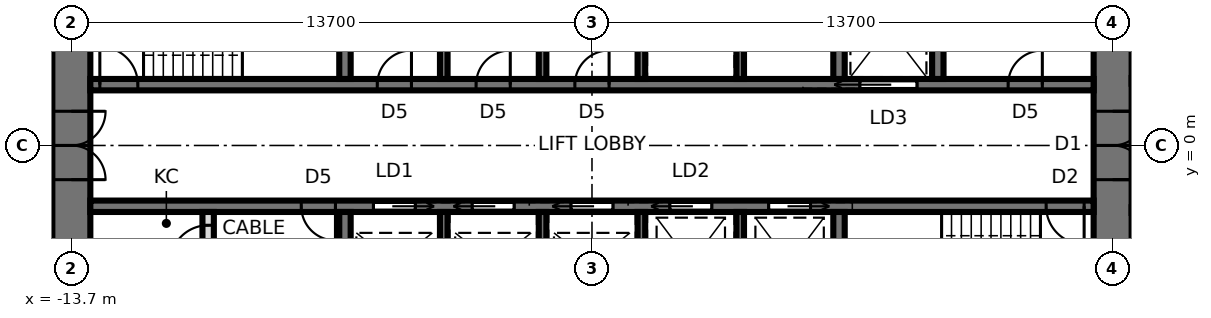
"""IFC4 building model, lengths in metres.
Left out: names, types, materials, properties, quantities, classifications, styles, units other than length and angle.
Written with IfcOpenShell. Run it as: python <this file> out.ifc"""

import sys

from ifc_helpers import new_model, si_unit, direction, frame, frame_2d, origin, place, context, subcontext, project, spatial, rectangle, extrude, element, fill, save


model = new_model("IFC4")
c1 = context("Model", 3, precision=1e-05, world=origin(), true_north=direction((0.0, 1.0)))
c2 = subcontext(c1, "Body", "Model", "MODEL_VIEW")
j1 = project(units=[si_unit("LENGTHUNIT", "METRE"), si_unit("PLANEANGLEUNIT", "RADIAN")], contexts=[c1])
p1 = place(None, origin())
s1 = spatial("IfcSite", under=j1, at=p1, CompositionType="ELEMENT")
p2 = place(p1, origin())
s2 = spatial("IfcBuilding", under=s1, at=p2, CompositionType="ELEMENT")
p3 = place(p2, frame((0.0, 0.0, 96.3)))
s3 = spatial("IfcBuildingStorey", under=s2, at=p3, CompositionType="ELEMENT", Elevation=96.3)
p4 = place(p3, frame((13.7, -9.5, 0.0), z_axis=(0.0, 0.0, 1.0), x_axis=(0.0, 1.0, 0.0)))
e1 = element("IfcWall", 1, at=p4, inside=s3, PredefinedType="SHEAR", context=c2, shape_type="SweptSolid", body=[
    extrude(rectangle(XDim=19.0, YDim=1.0, at=frame_2d((9.5, 0.0))), origin(), (0.0, 0.0, 1.0), 3.9),
])
p5 = place(p4, frame((8.6, 0.0, 0.0)))
e2 = element("IfcOpeningElement", 2, at=p5, cuts=e1, PredefinedType="OPENING", context=c2, shape_type="SweptSolid", body=[
    extrude(rectangle(XDim=1.8, YDim=2.4, at=frame_2d((0.9, 1.2))), frame((0.0, 0.51, 0.0), z_axis=(0.0, -1.0, 0.0), x_axis=(1.0, 0.0, 0.0)), (0.0, 0.0, 1.0), 1.02),
])
p6 = place(p3, frame((-13.7, 9.5, 0.0), z_axis=(0.0, 0.0, 1.0), x_axis=(0.0, -1.0, 0.0)))
e3 = element("IfcWall", 3, at=p6, inside=s3, PredefinedType="SHEAR", context=c2, shape_type="SweptSolid", body=[
    extrude(rectangle(XDim=19.0, YDim=1.0, at=frame_2d((9.5, 0.0))), origin(), (0.0, 0.0, 1.0), 3.9),
])
p7 = place(p6, frame((8.6, 0.0, 0.0)))
e4 = element("IfcOpeningElement", 4, at=p7, cuts=e3, PredefinedType="OPENING", context=c2, shape_type="SweptSolid", body=[
    extrude(rectangle(XDim=1.8, YDim=2.4, at=frame_2d((0.9, 1.2))), frame((0.0, 0.51, 0.0), z_axis=(0.0, -1.0, 0.0), x_axis=(1.0, 0.0, 0.0)), (0.0, 0.0, 1.0), 1.02),
])
p8 = place(p3, frame((-13.2, 1.6, 0.0), z_axis=(0.0, 0.0, 1.0), x_axis=(1.0, 0.0, 0.0)))
e5 = element("IfcWall", 5, at=p8, inside=s3, PredefinedType="SHEAR", context=c2, shape_type="SweptSolid", body=[
    extrude(rectangle(XDim=26.4, YDim=0.3, at=frame_2d((13.2, 0.0))), origin(), (0.0, 0.0, 1.0), 3.9),
])
p9 = place(p8, frame((0.25, 0.0, 0.0)))
e6 = element("IfcOpeningElement", 6, at=p9, cuts=e5, PredefinedType="OPENING", context=c2, shape_type="SweptSolid", body=[
    extrude(rectangle(XDim=1.0, YDim=2.1, at=frame_2d((0.5, 1.05))), frame((0.0, 0.16, 0.0), z_axis=(0.0, -1.0, 0.0), x_axis=(1.0, 0.0, 0.0)), (0.0, 0.0, 1.0), 0.32),
])
p10 = place(p8, frame((20.25, 0.0, 0.0)))
e7 = element("IfcOpeningElement", 7, at=p10, cuts=e5, PredefinedType="OPENING", context=c2, shape_type="SweptSolid", body=[
    extrude(rectangle(XDim=1.5, YDim=2.4, at=frame_2d((0.75, 1.2))), frame((0.0, 0.16, 0.0), z_axis=(0.0, -1.0, 0.0), x_axis=(1.0, 0.0, 0.0)), (0.0, 0.0, 1.0), 0.32),
])
p11 = place(p8, frame((7.55, 0.0, 0.0)))
e8 = element("IfcOpeningElement", 8, at=p11, cuts=e5, PredefinedType="OPENING", context=c2, shape_type="SweptSolid", body=[
    extrude(rectangle(XDim=0.9, YDim=2.1, at=frame_2d((0.45, 1.05))), frame((0.0, 0.16, 0.0), z_axis=(0.0, -1.0, 0.0), x_axis=(1.0, 0.0, 0.0)), (0.0, 0.0, 1.0), 0.32),
])
p12 = place(p8, frame((10.15, 0.0, 0.0)))
e9 = element("IfcOpeningElement", 9, at=p12, cuts=e5, PredefinedType="OPENING", context=c2, shape_type="SweptSolid", body=[
    extrude(rectangle(XDim=0.9, YDim=2.1, at=frame_2d((0.45, 1.05))), frame((0.0, 0.16, 0.0), z_axis=(0.0, -1.0, 0.0), x_axis=(1.0, 0.0, 0.0)), (0.0, 0.0, 1.0), 0.32),
])
p13 = place(p8, frame((12.75, 0.0, 0.0)))
e10 = element("IfcOpeningElement", 10, at=p13, cuts=e5, PredefinedType="OPENING", context=c2, shape_type="SweptSolid", body=[
    extrude(rectangle(XDim=0.9, YDim=2.1, at=frame_2d((0.45, 1.05))), frame((0.0, 0.16, 0.0), z_axis=(0.0, -1.0, 0.0), x_axis=(1.0, 0.0, 0.0)), (0.0, 0.0, 1.0), 0.32),
])
p14 = place(p8, frame((24.15, 0.0, 0.0)))
e11 = element("IfcOpeningElement", 11, at=p14, cuts=e5, PredefinedType="OPENING", context=c2, shape_type="SweptSolid", body=[
    extrude(rectangle(XDim=0.9, YDim=2.1, at=frame_2d((0.45, 1.05))), frame((0.0, 0.16, 0.0), z_axis=(0.0, -1.0, 0.0), x_axis=(1.0, 0.0, 0.0)), (0.0, 0.0, 1.0), 0.32),
])
p15 = place(p3, frame((-13.2, -1.6, 0.0), z_axis=(0.0, 0.0, 1.0), x_axis=(1.0, 0.0, 0.0)))
e12 = element("IfcWall", 12, at=p15, inside=s3, PredefinedType="SHEAR", context=c2, shape_type="SweptSolid", body=[
    extrude(rectangle(XDim=26.4, YDim=0.3, at=frame_2d((13.2, 0.0))), origin(), (0.0, 0.0, 1.0), 3.9),
])
p16 = place(p15, frame((25.15, 0.0, 0.0)))
e13 = element("IfcOpeningElement", 13, at=p16, cuts=e12, PredefinedType="OPENING", context=c2, shape_type="SweptSolid", body=[
    extrude(rectangle(XDim=1.0, YDim=2.1, at=frame_2d((0.5, 1.05))), frame((0.0, 0.16, 0.0), z_axis=(0.0, -1.0, 0.0), x_axis=(1.0, 0.0, 0.0)), (0.0, 0.0, 1.0), 0.32),
])
p17 = place(p15, frame((7.45, 0.0, 0.0)))
e14 = element("IfcOpeningElement", 14, at=p17, cuts=e12, PredefinedType="OPENING", context=c2, shape_type="SweptSolid", body=[
    extrude(rectangle(XDim=1.1, YDim=2.3, at=frame_2d((0.55, 1.15))), frame((0.0, 0.16, 0.0), z_axis=(0.0, -1.0, 0.0), x_axis=(1.0, 0.0, 0.0)), (0.0, 0.0, 1.0), 0.32),
])
p18 = place(p15, frame((10.05, 0.0, 0.0)))
e15 = element("IfcOpeningElement", 15, at=p18, cuts=e12, PredefinedType="OPENING", context=c2, shape_type="SweptSolid", body=[
    extrude(rectangle(XDim=1.1, YDim=2.3, at=frame_2d((0.55, 1.15))), frame((0.0, 0.16, 0.0), z_axis=(0.0, -1.0, 0.0), x_axis=(1.0, 0.0, 0.0)), (0.0, 0.0, 1.0), 0.32),
])
p19 = place(p15, frame((12.65, 0.0, 0.0)))
e16 = element("IfcOpeningElement", 16, at=p19, cuts=e12, PredefinedType="OPENING", context=c2, shape_type="SweptSolid", body=[
    extrude(rectangle(XDim=1.1, YDim=2.3, at=frame_2d((0.55, 1.15))), frame((0.0, 0.16, 0.0), z_axis=(0.0, -1.0, 0.0), x_axis=(1.0, 0.0, 0.0)), (0.0, 0.0, 1.0), 0.32),
])
p20 = place(p15, frame((15.25, 0.0, 0.0)))
e17 = element("IfcOpeningElement", 17, at=p20, cuts=e12, PredefinedType="OPENING", context=c2, shape_type="SweptSolid", body=[
    extrude(rectangle(XDim=1.1, YDim=2.3, at=frame_2d((0.55, 1.15))), frame((0.0, 0.16, 0.0), z_axis=(0.0, -1.0, 0.0), x_axis=(1.0, 0.0, 0.0)), (0.0, 0.0, 1.0), 0.32),
])
p21 = place(p15, frame((17.85, 0.0, 0.0)))
e18 = element("IfcOpeningElement", 18, at=p21, cuts=e12, PredefinedType="OPENING", context=c2, shape_type="SweptSolid", body=[
    extrude(rectangle(XDim=1.1, YDim=2.3, at=frame_2d((0.55, 1.15))), frame((0.0, 0.16, 0.0), z_axis=(0.0, -1.0, 0.0), x_axis=(1.0, 0.0, 0.0)), (0.0, 0.0, 1.0), 0.32),
])
p22 = place(p15, frame((5.55, 0.0, 0.0)))
e19 = element("IfcOpeningElement", 19, at=p22, cuts=e12, PredefinedType="OPENING", context=c2, shape_type="SweptSolid", body=[
    extrude(rectangle(XDim=0.9, YDim=2.1, at=frame_2d((0.45, 1.05))), frame((0.0, 0.16, 0.0), z_axis=(0.0, -1.0, 0.0), x_axis=(1.0, 0.0, 0.0)), (0.0, 0.0, 1.0), 0.32),
])
for number, where, z_axis, x_axis in (
    (20, (-6.5, 1.75, 0.0), (0.0, 0.0, 1.0), (0.0, 1.0, 0.0)),
    (21, (6.5, 1.75, 0.0), (0.0, 0.0, 1.0), (0.0, 1.0, 0.0)),
):
    element("IfcWall", number, at=place(p3, frame(where, z_axis=z_axis, x_axis=x_axis)), inside=s3, PredefinedType="SHEAR", context=c2, shape_type="SweptSolid", body=[
        extrude(rectangle(XDim=2.7, YDim=0.3, at=frame_2d((1.35, 0.0))), origin(), (0.0, 0.0, 1.0), 3.9),
    ])
for number, where, z_axis, x_axis in (
    (22, (-3.9, 1.75, 0.0), (0.0, 0.0, 1.0), (0.0, 1.0, 0.0)),
    (23, (-1.3, 1.75, 0.0), (0.0, 0.0, 1.0), (0.0, 1.0, 0.0)),
    (24, (1.3, 1.75, 0.0), (0.0, 0.0, 1.0), (0.0, 1.0, 0.0)),
    (25, (3.9, 1.75, 0.0), (0.0, 0.0, 1.0), (0.0, 1.0, 0.0)),
):
    element("IfcWall", number, at=place(p3, frame(where, z_axis=z_axis, x_axis=x_axis)), inside=s3, PredefinedType="SHEAR", context=c2, shape_type="SweptSolid", body=[
        extrude(rectangle(XDim=2.7, YDim=0.2, at=frame_2d((1.35, 0.0))), origin(), (0.0, 0.0, 1.0), 3.9),
    ])
for number, where, z_axis, x_axis in (
    (26, (-6.5, -1.75, 0.0), (0.0, 0.0, 1.0), (0.0, -1.0, 0.0)),
    (27, (6.5, -1.75, 0.0), (0.0, 0.0, 1.0), (0.0, -1.0, 0.0)),
):
    element("IfcWall", number, at=place(p3, frame(where, z_axis=z_axis, x_axis=x_axis)), inside=s3, PredefinedType="SHEAR", context=c2, shape_type="SweptSolid", body=[
        extrude(rectangle(XDim=2.7, YDim=0.3, at=frame_2d((1.35, 0.0))), origin(), (0.0, 0.0, 1.0), 3.9),
    ])
for number, where, z_axis, x_axis in (
    (28, (-3.9, -1.75, 0.0), (0.0, 0.0, 1.0), (0.0, -1.0, 0.0)),
    (29, (-1.3, -1.75, 0.0), (0.0, 0.0, 1.0), (0.0, -1.0, 0.0)),
    (30, (1.3, -1.75, 0.0), (0.0, 0.0, 1.0), (0.0, -1.0, 0.0)),
    (31, (3.9, -1.75, 0.0), (0.0, 0.0, 1.0), (0.0, -1.0, 0.0)),
):
    element("IfcWall", number, at=place(p3, frame(where, z_axis=z_axis, x_axis=x_axis)), inside=s3, PredefinedType="SHEAR", context=c2, shape_type="SweptSolid", body=[
        extrude(rectangle(XDim=2.7, YDim=0.2, at=frame_2d((1.35, 0.0))), origin(), (0.0, 0.0, 1.0), 3.9),
    ])
p23 = place(p3, frame((9.1, 1.75, 0.0), z_axis=(0.0, 0.0, 1.0), x_axis=(0.0, 1.0, 0.0)))
e32 = element("IfcWall", 32, at=p23, inside=s3, PredefinedType="SHEAR", context=c2, shape_type="SweptSolid", body=[
    extrude(rectangle(XDim=2.7, YDim=0.3, at=frame_2d((1.35, 0.0))), origin(), (0.0, 0.0, 1.0), 3.9),
])
p24 = place(p3, frame((-10.1, -3.25, 0.0), z_axis=(0.0, 0.0, 1.0), x_axis=(0.0, 1.0, 0.0)))
e33 = element("IfcWall", 33, at=p24, inside=s3, PredefinedType="PARTITIONING", context=c2, shape_type="SweptSolid", body=[
    extrude(rectangle(XDim=1.5, YDim=0.3, at=frame_2d((0.75, 0.0))), origin(), (0.0, 0.0, 1.0), 3.74),
])
p25 = place(p24, frame((0.15, 0.0, 0.0)))
e34 = element("IfcOpeningElement", 34, at=p25, cuts=e33, PredefinedType="OPENING", context=c2, shape_type="SweptSolid", body=[
    extrude(rectangle(XDim=1.0, YDim=2.4, at=frame_2d((0.5, 1.2))), frame((0.0, 0.16, 0.0), z_axis=(0.0, -1.0, 0.0), x_axis=(1.0, 0.0, 0.0)), (0.0, 0.0, 1.0), 0.32),
])
p26 = place(p3, frame((18.4, 1.7, 0.0), z_axis=(0.0, 0.0, 1.0), x_axis=(-1.0, 0.0, 0.0)))
e35 = element("IfcWall", 35, at=p26, inside=s3, PredefinedType="PARTITIONING", context=c2, shape_type="SweptSolid", body=[
    extrude(rectangle(XDim=4.2, YDim=0.15, at=frame_2d((2.1, 0.0))), origin(), (0.0, 0.0, 1.0), 3.74),
])
p27 = place(p7, origin())
e36 = element("IfcDoor", 36, at=p27, inside=s3, OperationType="DOUBLE_DOOR_SINGLE_SWING", PredefinedType="DOOR", context=c2, shape_type="SweptSolid", body=[
    extrude(rectangle(XDim=1.72, YDim=2.36, at=frame_2d((0.9, 1.18))), frame((0.0, 0.025, 0.0), z_axis=(0.0, -1.0, 0.0), x_axis=(1.0, 0.0, 0.0)), (0.0, 0.0, 1.0), 0.05),
    extrude(rectangle(XDim=0.04, YDim=2.4, at=frame_2d((0.02, 1.2))), frame((0.0, 0.25, 0.0), z_axis=(0.0, -1.0, 0.0), x_axis=(1.0, 0.0, 0.0)), (0.0, 0.0, 1.0), 0.5),
    extrude(rectangle(XDim=0.04, YDim=2.4, at=frame_2d((1.78, 1.2))), frame((0.0, 0.25, 0.0), z_axis=(0.0, -1.0, 0.0), x_axis=(1.0, 0.0, 0.0)), (0.0, 0.0, 1.0), 0.5),
    extrude(rectangle(XDim=1.72, YDim=0.04, at=frame_2d((0.9, 2.38))), frame((0.0, 0.25, 0.0), z_axis=(0.0, -1.0, 0.0), x_axis=(1.0, 0.0, 0.0)), (0.0, 0.0, 1.0), 0.5),
])
fill(e4, e36)
p28 = place(p5, frame((1.8, 0.0, 0.0), z_axis=(0.0, 0.0, 1.0), x_axis=(-1.0, 0.0, 0.0)))
e37 = element("IfcDoor", 37, at=p28, inside=s3, OperationType="DOUBLE_DOOR_SINGLE_SWING", PredefinedType="DOOR", context=c2, shape_type="SweptSolid", body=[
    extrude(rectangle(XDim=1.72, YDim=2.36, at=frame_2d((0.9, 1.18))), frame((0.0, 0.025, 0.0), z_axis=(0.0, -1.0, 0.0), x_axis=(1.0, 0.0, 0.0)), (0.0, 0.0, 1.0), 0.05),
    extrude(rectangle(XDim=0.04, YDim=2.4, at=frame_2d((1.78, 1.2))), frame((0.0, 0.25, 0.0), z_axis=(0.0, -1.0, 0.0), x_axis=(1.0, 0.0, 0.0)), (0.0, 0.0, 1.0), 0.5),
    extrude(rectangle(XDim=0.04, YDim=2.4, at=frame_2d((0.02, 1.2))), frame((0.0, 0.25, 0.0), z_axis=(0.0, -1.0, 0.0), x_axis=(1.0, 0.0, 0.0)), (0.0, 0.0, 1.0), 0.5),
    extrude(rectangle(XDim=1.72, YDim=0.04, at=frame_2d((0.9, 2.38))), frame((0.0, 0.25, 0.0), z_axis=(0.0, -1.0, 0.0), x_axis=(1.0, 0.0, 0.0)), (0.0, 0.0, 1.0), 0.5),
])
fill(e2, e37)
p29 = place(p9, origin())
e38 = element("IfcDoor", 38, at=p29, inside=s3, OperationType="SINGLE_SWING_LEFT", PredefinedType="DOOR", context=c2, shape_type="SweptSolid", body=[
    extrude(rectangle(XDim=1.0, YDim=2.1, at=frame_2d((0.5, 1.05))), frame((0.0, 0.025, 0.0), z_axis=(0.0, -1.0, 0.0), x_axis=(1.0, 0.0, 0.0)), (0.0, 0.0, 1.0), 0.05),
])
fill(e6, e38)
p30 = place(p16, frame((1.0, 0.0, 0.0), z_axis=(0.0, 0.0, 1.0), x_axis=(-1.0, 0.0, 0.0)))
e39 = element("IfcDoor", 39, at=p30, inside=s3, OperationType="SINGLE_SWING_LEFT", PredefinedType="DOOR", context=c2, shape_type="SweptSolid", body=[
    extrude(rectangle(XDim=1.0, YDim=2.1, at=frame_2d((0.5, 1.05))), frame((0.0, 0.025, 0.0), z_axis=(0.0, -1.0, 0.0), x_axis=(1.0, 0.0, 0.0)), (0.0, 0.0, 1.0), 0.05),
])
fill(e13, e39)
p31 = place(p10, origin())
e40 = element("IfcDoor", 40, at=p31, inside=s3, OperationType="SLIDING_TO_LEFT", PredefinedType="DOOR", context=c2, shape_type="SweptSolid", body=[
    extrude(rectangle(XDim=1.5, YDim=2.4, at=frame_2d((0.75, 1.2))), frame((0.0, 0.025, 0.0), z_axis=(0.0, -1.0, 0.0), x_axis=(1.0, 0.0, 0.0)), (0.0, 0.0, 1.0), 0.05),
])
fill(e7, e40)
p32 = place(p11, origin())
e41 = element("IfcDoor", 41, at=p32, inside=s3, OperationType="SINGLE_SWING_RIGHT", PredefinedType="DOOR", context=c2, shape_type="SweptSolid", body=[
    extrude(rectangle(XDim=0.9, YDim=2.1, at=frame_2d((0.45, 1.05))), frame((0.0, 0.025, 0.0), z_axis=(0.0, -1.0, 0.0), x_axis=(1.0, 0.0, 0.0)), (0.0, 0.0, 1.0), 0.05),
])
fill(e8, e41)
p33 = place(p12, origin())
e42 = element("IfcDoor", 42, at=p33, inside=s3, OperationType="SINGLE_SWING_RIGHT", PredefinedType="DOOR", context=c2, shape_type="SweptSolid", body=[
    extrude(rectangle(XDim=0.9, YDim=2.1, at=frame_2d((0.45, 1.05))), frame((0.0, 0.025, 0.0), z_axis=(0.0, -1.0, 0.0), x_axis=(1.0, 0.0, 0.0)), (0.0, 0.0, 1.0), 0.05),
])
fill(e9, e42)
p34 = place(p13, origin())
e43 = element("IfcDoor", 43, at=p34, inside=s3, OperationType="SINGLE_SWING_RIGHT", PredefinedType="DOOR", context=c2, shape_type="SweptSolid", body=[
    extrude(rectangle(XDim=0.9, YDim=2.1, at=frame_2d((0.45, 1.05))), frame((0.0, 0.025, 0.0), z_axis=(0.0, -1.0, 0.0), x_axis=(1.0, 0.0, 0.0)), (0.0, 0.0, 1.0), 0.05),
])
fill(e10, e43)
p35 = place(p17, frame((1.1, 0.0, 0.0), z_axis=(0.0, 0.0, 1.0), x_axis=(-1.0, 0.0, 0.0)))
e44 = element("IfcDoor", 44, at=p35, inside=s3, OperationType="SLIDING_TO_LEFT", PredefinedType="DOOR", context=c2, shape_type="SweptSolid", body=[
    extrude(rectangle(XDim=1.1, YDim=2.3, at=frame_2d((0.55, 1.15))), frame((0.0, 0.025, 0.0), z_axis=(0.0, -1.0, 0.0), x_axis=(1.0, 0.0, 0.0)), (0.0, 0.0, 1.0), 0.05),
])
fill(e14, e44)
p36 = place(p18, frame((1.1, 0.0, 0.0), z_axis=(0.0, 0.0, 1.0), x_axis=(-1.0, 0.0, 0.0)))
e45 = element("IfcDoor", 45, at=p36, inside=s3, OperationType="SLIDING_TO_RIGHT", PredefinedType="DOOR", context=c2, shape_type="SweptSolid", body=[
    extrude(rectangle(XDim=1.1, YDim=2.3, at=frame_2d((0.55, 1.15))), frame((0.0, 0.025, 0.0), z_axis=(0.0, -1.0, 0.0), x_axis=(1.0, 0.0, 0.0)), (0.0, 0.0, 1.0), 0.05),
])
fill(e15, e45)
p37 = place(p19, frame((1.1, 0.0, 0.0), z_axis=(0.0, 0.0, 1.0), x_axis=(-1.0, 0.0, 0.0)))
e46 = element("IfcDoor", 46, at=p37, inside=s3, OperationType="SLIDING_TO_RIGHT", PredefinedType="DOOR", context=c2, shape_type="SweptSolid", body=[
    extrude(rectangle(XDim=1.1, YDim=2.3, at=frame_2d((0.55, 1.15))), frame((0.0, 0.025, 0.0), z_axis=(0.0, -1.0, 0.0), x_axis=(1.0, 0.0, 0.0)), (0.0, 0.0, 1.0), 0.05),
])
fill(e16, e46)
p38 = place(p20, frame((1.1, 0.0, 0.0), z_axis=(0.0, 0.0, 1.0), x_axis=(-1.0, 0.0, 0.0)))
e47 = element("IfcDoor", 47, at=p38, inside=s3, OperationType="SLIDING_TO_RIGHT", PredefinedType="DOOR", context=c2, shape_type="SweptSolid", body=[
    extrude(rectangle(XDim=1.1, YDim=2.3, at=frame_2d((0.55, 1.15))), frame((0.0, 0.025, 0.0), z_axis=(0.0, -1.0, 0.0), x_axis=(1.0, 0.0, 0.0)), (0.0, 0.0, 1.0), 0.05),
])
fill(e17, e47)
p39 = place(p21, frame((1.1, 0.0, 0.0), z_axis=(0.0, 0.0, 1.0), x_axis=(-1.0, 0.0, 0.0)))
e48 = element("IfcDoor", 48, at=p39, inside=s3, OperationType="SLIDING_TO_LEFT", PredefinedType="DOOR", context=c2, shape_type="SweptSolid", body=[
    extrude(rectangle(XDim=1.1, YDim=2.3, at=frame_2d((0.55, 1.15))), frame((0.0, 0.025, 0.0), z_axis=(0.0, -1.0, 0.0), x_axis=(1.0, 0.0, 0.0)), (0.0, 0.0, 1.0), 0.05),
])
fill(e18, e48)
p40 = place(p14, origin())
e49 = element("IfcDoor", 49, at=p40, inside=s3, OperationType="SINGLE_SWING_RIGHT", PredefinedType="DOOR", context=c2, shape_type="SweptSolid", body=[
    extrude(rectangle(XDim=0.9, YDim=2.1, at=frame_2d((0.45, 1.05))), frame((0.0, 0.025, 0.0), z_axis=(0.0, -1.0, 0.0), x_axis=(1.0, 0.0, 0.0)), (0.0, 0.0, 1.0), 0.05),
])
fill(e11, e49)
p41 = place(p22, frame((0.9, 0.0, 0.0), z_axis=(0.0, 0.0, 1.0), x_axis=(-1.0, 0.0, 0.0)))
e50 = element("IfcDoor", 50, at=p41, inside=s3, OperationType="SINGLE_SWING_LEFT", PredefinedType="DOOR", context=c2, shape_type="SweptSolid", body=[
    extrude(rectangle(XDim=0.9, YDim=2.1, at=frame_2d((0.45, 1.05))), frame((0.0, 0.025, 0.0), z_axis=(0.0, -1.0, 0.0), x_axis=(1.0, 0.0, 0.0)), (0.0, 0.0, 1.0), 0.05),
])
fill(e19, e50)
p42 = place(p25, origin())
e51 = element("IfcDoor", 51, at=p42, inside=s3, OperationType="SINGLE_SWING_LEFT", PredefinedType="DOOR", context=c2, shape_type="SweptSolid", body=[
    extrude(rectangle(XDim=1.0, YDim=2.4, at=frame_2d((0.5, 1.2))), frame((0.0, 0.025, 0.0), z_axis=(0.0, -1.0, 0.0), x_axis=(1.0, 0.0, 0.0)), (0.0, 0.0, 1.0), 0.05),
])
fill(e34, e51)
save(model, sys.argv[1])
